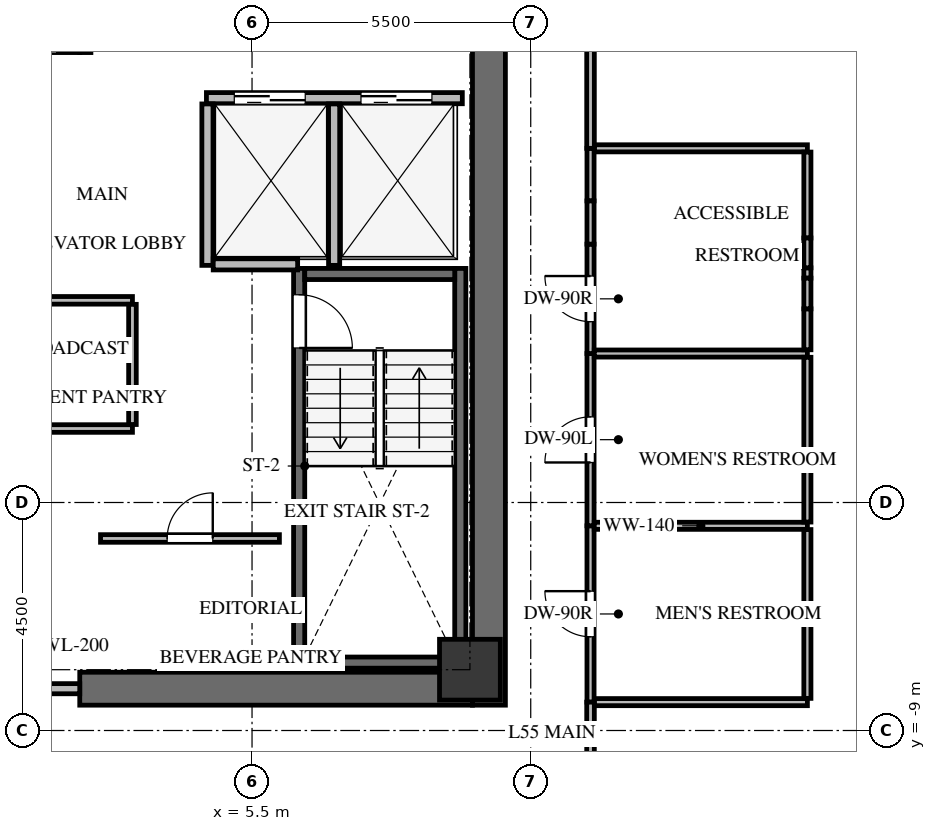
"""IFC4 building model, lengths in metres.
Left out: names, types, materials, properties, quantities, classifications, styles, units other than length and angle.
Written with IfcOpenShell. Run it as: python <this file> out.ifc"""

import sys

from ifc_helpers import new_model, si_unit, direction, frame, frame_2d, origin, origin_2d, place, context, subcontext, project, spatial, rectangle, extrude, source, transform, mapped, element, fill, save


model = new_model("IFC4")
c1 = context("Model", 3, precision=1e-05, world=origin(), true_north=direction((0.0, 1.0)))
c2 = subcontext(c1, "Body", "Model", "MODEL_VIEW")
j1 = project(units=[si_unit("LENGTHUNIT", "METRE"), si_unit("PLANEANGLEUNIT", "RADIAN")], contexts=[c1])
p1 = place(None, origin())
s1 = spatial("IfcSite", under=j1, at=p1, CompositionType="ELEMENT")
p2 = place(p1, origin())
s2 = spatial("IfcBuilding", under=s1, at=p2, CompositionType="ELEMENT")
p3 = place(p2, frame((0.0, 0.0, 200.2)))
s3 = spatial("IfcBuildingStorey", under=s2, at=p3, CompositionType="ELEMENT", Elevation=200.2)
p4 = place(p3, frame((10.175, -8.5, 0.0), z_axis=(0.0, 0.0, 1.0), x_axis=(0.0, 1.0, 0.0)))
e1 = element("IfcWall", 1, at=p4, inside=s3, PredefinedType="SHEAR", context=c2, shape_type="SweptSolid", body=[
    extrude(rectangle(XDim=17.0, YDim=0.65, at=frame_2d((8.5, 0.0))), origin(), (0.0, 0.0, 1.0), 3.0),
])
p5 = place(p3, frame((2.1, -8.175, 0.0), z_axis=(0.0, 0.0, 1.0), x_axis=(1.0, 0.0, 0.0)))
e2 = element("IfcWall", 2, at=p5, inside=s3, PredefinedType="SHEAR", context=c2, shape_type="SweptSolid", body=[
    extrude(rectangle(XDim=7.75, YDim=0.65, at=frame_2d((3.875, 0.0))), origin(), (0.0, 0.0, 1.0), 3.0),
])
p6 = place(p3, frame((9.61, -7.77, -0.24), z_axis=(0.0, 0.0, 1.0), x_axis=(0.0, 1.0, 0.0)))
e3 = element("IfcWall", 3, at=p6, inside=s3, PredefinedType="SHEAR", context=c2, shape_type="SweptSolid", body=[
    extrude(rectangle(XDim=7.89, YDim=0.22, at=frame_2d((3.945, 0.0))), origin(), (0.0, 0.0, 1.0), 3.0),
])
p7 = place(p3, frame((6.43, 0.12, -0.24), z_axis=(0.0, 0.0, 1.0), x_axis=(0.0, -1.0, 0.0)))
e4 = element("IfcWall", 4, at=p7, inside=s3, PredefinedType="SHEAR", context=c2, shape_type="SweptSolid", body=[
    extrude(rectangle(XDim=7.89, YDim=0.22, at=frame_2d((3.945, 0.0))), origin(), (0.0, 0.0, 1.0), 3.0),
])
p8 = place(p7, frame((0.52, 0.0, 0.0)))
e5 = element("IfcOpeningElement", 5, at=p8, cuts=e4, PredefinedType="OPENING", context=c2, shape_type="SweptSolid", body=[
    extrude(rectangle(XDim=1.05, YDim=2.15, at=frame_2d((0.525, 1.075))), frame((0.0, 0.12, 0.0), z_axis=(0.0, -1.0, 0.0), x_axis=(1.0, 0.0, 0.0)), (0.0, 0.0, 1.0), 0.24),
])
for number, where, z_axis, x_axis in (
    (6, (6.54, -7.66, -0.24), (0.0, 0.0, 1.0), (1.0, 0.0, 0.0)),
    (7, (9.5, 0.01, -0.24), (0.0, 0.0, 1.0), (-1.0, 0.0, 0.0)),
):
    element("IfcWall", number, at=place(p3, frame(where, z_axis=z_axis, x_axis=x_axis)), inside=s3, PredefinedType="SHEAR", context=c2, shape_type="SweptSolid", body=[
        extrude(rectangle(XDim=2.96, YDim=0.22, at=frame_2d((1.48, 0.0))), origin(), (0.0, 0.0, 1.0), 3.0),
    ])
p9 = place(p3, frame((2.21, 4.38, -0.24), z_axis=(0.0, 0.0, 1.0), x_axis=(0.0, 1.0, 0.0)))
e8 = element("IfcWall", 8, at=p9, inside=s3, PredefinedType="SHEAR", context=c2, shape_type="SweptSolid", body=[
    extrude(rectangle(XDim=3.4, YDim=0.22, at=frame_2d((1.7, 0.0))), origin(), (0.0, 0.0, 1.0), 3.0),
])
p10 = place(p3, frame((-5.25, 4.49, -0.24), z_axis=(0.0, 0.0, 1.0), x_axis=(1.0, 0.0, 0.0)))
e9 = element("IfcWall", 9, at=p10, inside=s3, PredefinedType="SHEAR", context=c2, shape_type="SweptSolid", body=[
    extrude(rectangle(XDim=7.35, YDim=0.22, at=frame_2d((3.675, 0.0))), origin(), (0.0, 0.0, 1.0), 3.0),
])
p11 = place(p10, frame((5.85, 0.0, 0.0)))
e10 = element("IfcOpeningElement", 10, at=p11, cuts=e9, PredefinedType="OPENING", context=c2, shape_type="SweptSolid", body=[
    extrude(rectangle(XDim=1.05, YDim=2.15, at=frame_2d((0.525, 1.075))), frame((0.0, 0.12, 0.0), z_axis=(0.0, -1.0, 0.0), x_axis=(1.0, 0.0, 0.0)), (0.0, 0.0, 1.0), 0.24),
])
m1 = source(origin(), c2, "Body", "SweptSolid", [
    extrude(rectangle(XDim=1.2, YDim=1.2, at=origin_2d()), origin(), (0.0, 0.0, 1.0), 3.0),
])
p12 = place(p3, frame((9.8, -7.8, -0.24), z_axis=(0.0, 0.0, 1.0), x_axis=(1.0, 0.0, 0.0)))
e11 = element("IfcColumn", 11, at=p12, inside=s3, PredefinedType="COLUMN", context=c2, shape_type="MappedRepresentation", body=[
    mapped(m1, transform((0.0, 0.0, 0.0), x_axis=(1.0, 0.0, 0.0), y_axis=(0.0, 1.0, 0.0), z_axis=(0.0, 0.0, 1.0), scale=1.0)),
])
p13 = place(p3, frame((-2.1, -8.175, 0.0), z_axis=(0.0, 0.0, 1.0), x_axis=(1.0, 0.0, 0.0)))
e12 = element("IfcWall", 12, at=p13, inside=s3, PredefinedType="SOLIDWALL", context=c2, shape_type="SweptSolid", body=[
    extrude(rectangle(XDim=4.2, YDim=0.2, at=frame_2d((2.1, 0.0))), origin(), (0.0, 0.0, 1.0), 2.745),
])
p14 = place(p13, frame((1.2, 0.0, 0.0)))
e13 = element("IfcOpeningElement", 13, at=p14, cuts=e12, PredefinedType="OPENING", context=c2, shape_type="SweptSolid", body=[
    extrude(rectangle(XDim=1.8, YDim=2.15, at=frame_2d((0.9, 1.075))), frame((0.0, 0.11, 0.0), z_axis=(0.0, -1.0, 0.0), x_axis=(1.0, 0.0, 0.0)), (0.0, 0.0, 1.0), 0.22),
])
p15 = place(p3, frame((4.6, 3.48, 0.0), z_axis=(0.0, 0.0, 1.0), x_axis=(1.0, 0.0, 0.0)))
e14 = element("IfcWall", 14, at=p15, inside=s3, PredefinedType="SOLIDWALL", context=c2, shape_type="SweptSolid", body=[
    extrude(rectangle(XDim=5.05, YDim=0.22, at=frame_2d((2.525, 0.0))), origin(), (0.0, 0.0, 1.0), 2.745),
])
p16 = place(p15, frame((0.55, 0.0, 0.0)))
e15 = element("IfcOpeningElement", 15, at=p16, cuts=e14, PredefinedType="OPENING", context=c2, shape_type="SweptSolid", body=[
    extrude(rectangle(XDim=1.4, YDim=2.15, at=frame_2d((0.7, 1.075))), frame((0.0, 0.12, 0.0), z_axis=(0.0, -1.0, 0.0), x_axis=(1.0, 0.0, 0.0)), (0.0, 0.0, 1.0), 0.24),
])
p17 = place(p15, frame((3.05, 0.0, 0.0)))
e16 = element("IfcOpeningElement", 16, at=p17, cuts=e14, PredefinedType="OPENING", context=c2, shape_type="SweptSolid", body=[
    extrude(rectangle(XDim=1.4, YDim=2.15, at=frame_2d((0.7, 1.075))), frame((0.0, 0.12, 0.0), z_axis=(0.0, -1.0, 0.0), x_axis=(1.0, 0.0, 0.0)), (0.0, 0.0, 1.0), 0.24),
])
for number, where, z_axis, x_axis in (
    (17, (4.62, 0.18, 0.0), (0.0, 0.0, 1.0), (0.0, 1.0, 0.0)),
    (18, (7.12, 0.18, 0.0), (0.0, 0.0, 1.0), (0.0, 1.0, 0.0)),
):
    element("IfcWall", number, at=place(p3, frame(where, z_axis=z_axis, x_axis=x_axis)), inside=s3, PredefinedType="SOLIDWALL", context=c2, shape_type="SweptSolid", body=[
        extrude(rectangle(XDim=3.186, YDim=0.22, at=frame_2d((1.593, 0.0))), origin(), (0.0, 0.0, 1.0), 2.745),
    ])
p18 = place(p3, frame((4.734, 0.2, 0.0), z_axis=(0.0, 0.0, 1.0), x_axis=(1.0, 0.0, 0.0)))
e19 = element("IfcWall", 19, at=p18, inside=s3, PredefinedType="SOLIDWALL", context=c2, shape_type="SweptSolid", body=[
    extrude(rectangle(XDim=1.666, YDim=0.22, at=frame_2d((0.833, 0.0))), origin(), (0.0, 0.0, 1.0), 2.745),
])
p19 = place(p3, frame((2.51, -5.21, 0.0), z_axis=(0.0, 0.0, 1.0), x_axis=(1.0, 0.0, 0.0)))
e20 = element("IfcWall", 20, at=p19, inside=s3, PredefinedType="PARTITIONING", context=c2, shape_type="SweptSolid", body=[
    extrude(rectangle(XDim=3.53, YDim=0.15, at=frame_2d((1.765, 0.0))), origin(), (0.0, 0.0, 1.0), 2.745),
])
p20 = place(p19, frame((1.315, 0.0, 0.0)))
e21 = element("IfcOpeningElement", 21, at=p20, cuts=e20, PredefinedType="OPENING", context=c2, shape_type="SweptSolid", body=[
    extrude(rectangle(XDim=0.9, YDim=2.05, at=frame_2d((0.45, 1.025))), frame((0.0, 0.085, 0.0), z_axis=(0.0, -1.0, 0.0), x_axis=(1.0, 0.0, 0.0)), (0.0, 0.0, 1.0), 0.17),
])
p21 = place(p3, frame((3.14, -3.04, 0.0), z_axis=(0.0, 0.0, 1.0), x_axis=(-1.0, 0.0, 0.0)))
e22 = element("IfcWall", 22, at=p21, inside=s3, PredefinedType="PARTITIONING", context=c2, shape_type="SweptSolid", body=[
    extrude(rectangle(XDim=7.48, YDim=0.15, at=frame_2d((3.74, 0.0))), origin(), (0.0, 0.0, 1.0), 2.745),
])
p22 = place(p21, frame((3.29, 0.0, 0.0)))
e23 = element("IfcOpeningElement", 23, at=p22, cuts=e22, PredefinedType="OPENING", context=c2, shape_type="SweptSolid", body=[
    extrude(rectangle(XDim=0.9, YDim=2.05, at=frame_2d((0.45, 1.025))), frame((0.0, 0.085, 0.0), z_axis=(0.0, -1.0, 0.0), x_axis=(1.0, 0.0, 0.0)), (0.0, 0.0, 1.0), 0.17),
])
p23 = place(p3, frame((-4.34, -0.51, 0.0), z_axis=(0.0, 0.0, 1.0), x_axis=(1.0, 0.0, 0.0)))
e24 = element("IfcWall", 24, at=p23, inside=s3, PredefinedType="PARTITIONING", context=c2, shape_type="SweptSolid", body=[
    extrude(rectangle(XDim=7.48, YDim=0.15, at=frame_2d((3.74, 0.0))), origin(), (0.0, 0.0, 1.0), 2.745),
])
p24 = place(p3, frame((3.14, -0.589, 0.0), z_axis=(0.0, 0.0, 1.0), x_axis=(0.0, -1.0, 0.0)))
e25 = element("IfcWall", 25, at=p24, inside=s3, PredefinedType="PARTITIONING", context=c2, shape_type="SweptSolid", body=[
    extrude(rectangle(XDim=2.372, YDim=0.15, at=frame_2d((1.186, 0.0))), origin(), (0.0, 0.0, 1.0), 2.745),
])
p25 = place(p3, frame((12.18, -8.44, 0.0), z_axis=(0.0, 0.0, 1.0), x_axis=(0.0, 1.0, 0.0)))
e26 = element("IfcWall", 26, at=p25, inside=s3, PredefinedType="PARTITIONING", context=c2, shape_type="SweptSolid", body=[
    extrude(rectangle(XDim=3.48, YDim=0.14, at=frame_2d((1.74, 0.0))), origin(), (0.0, 0.0, 1.0), 2.745),
])
p26 = place(p25, frame((1.29, 0.0, 0.0)))
e27 = element("IfcOpeningElement", 27, at=p26, cuts=e26, PredefinedType="OPENING", context=c2, shape_type="SweptSolid", body=[
    extrude(rectangle(XDim=0.9, YDim=2.05, at=frame_2d((0.45, 1.025))), frame((0.0, 0.08, 0.0), z_axis=(0.0, -1.0, 0.0), x_axis=(1.0, 0.0, 0.0)), (0.0, 0.0, 1.0), 0.16),
])
p27 = place(p3, frame((12.18, -4.96, 0.0), z_axis=(0.0, 0.0, 1.0), x_axis=(0.0, 1.0, 0.0)))
e28 = element("IfcWall", 28, at=p27, inside=s3, PredefinedType="PARTITIONING", context=c2, shape_type="SweptSolid", body=[
    extrude(rectangle(XDim=3.4, YDim=0.14, at=frame_2d((1.7, 0.0))), origin(), (0.0, 0.0, 1.0), 2.745),
])
p28 = place(p27, frame((1.25, 0.0, 0.0)))
e29 = element("IfcOpeningElement", 29, at=p28, cuts=e28, PredefinedType="OPENING", context=c2, shape_type="SweptSolid", body=[
    extrude(rectangle(XDim=0.9, YDim=2.05, at=frame_2d((0.45, 1.025))), frame((0.0, 0.08, 0.0), z_axis=(0.0, -1.0, 0.0), x_axis=(1.0, 0.0, 0.0)), (0.0, 0.0, 1.0), 0.16),
])
p29 = place(p3, frame((12.18, -1.56, 0.0), z_axis=(0.0, 0.0, 1.0), x_axis=(0.0, 1.0, 0.0)))
e30 = element("IfcWall", 30, at=p29, inside=s3, PredefinedType="PARTITIONING", context=c2, shape_type="SweptSolid", body=[
    extrude(rectangle(XDim=2.159, YDim=0.14, at=frame_2d((1.08, 0.0))), origin(), (0.0, 0.0, 1.0), 2.745),
])
p30 = place(p29, frame((0.629, 0.0, 0.0)))
e31 = element("IfcOpeningElement", 31, at=p30, cuts=e30, PredefinedType="OPENING", context=c2, shape_type="SweptSolid", body=[
    extrude(rectangle(XDim=0.9, YDim=2.05, at=frame_2d((0.45, 1.025))), frame((0.0, 0.08, 0.0), z_axis=(0.0, -1.0, 0.0), x_axis=(1.0, 0.0, 0.0)), (0.0, 0.0, 1.0), 0.16),
])
p31 = place(p3, frame((12.18, 1.452, 0.0), z_axis=(0.0, 0.0, 1.0), x_axis=(0.0, 1.0, 0.0)))
e32 = element("IfcWall", 32, at=p31, inside=s3, PredefinedType="PARTITIONING", context=c2, shape_type="SweptSolid", body=[
    extrude(rectangle(XDim=1.038, YDim=0.14, at=frame_2d((0.519, 0.0))), origin(), (0.0, 0.0, 1.0), 2.745),
])
p32 = place(p3, frame((12.18, 0.599, 0.0), z_axis=(0.0, 0.0, 1.0), x_axis=(0.0, 1.0, 0.0)))
e33 = element("IfcWall", 33, at=p32, inside=s3, PredefinedType="PARTITIONING", context=c2, shape_type="SweptSolid", body=[
    extrude(rectangle(XDim=0.853, YDim=0.14, at=frame_2d((0.427, 0.0))), origin(), (0.0, 0.0, 1.0), 1.942),
])
p33 = place(p3, frame((12.18, 2.49, 0.0), z_axis=(0.0, 0.0, 1.0), x_axis=(0.0, 1.0, 0.0)))
e34 = element("IfcWall", 34, at=p33, inside=s3, PredefinedType="PARTITIONING", context=c2, shape_type="SweptSolid", body=[
    extrude(rectangle(XDim=7.611, YDim=0.15, at=frame_2d((3.806, 0.0))), origin(), (0.0, 0.0, 1.0), 2.745),
])
p34 = place(p33, frame((3.331, 0.0, 0.0)))
e35 = element("IfcOpeningElement", 35, at=p34, cuts=e34, PredefinedType="OPENING", context=c2, shape_type="SweptSolid", body=[
    extrude(rectangle(XDim=0.95, YDim=2.1, at=frame_2d((0.475, 1.05))), frame((0.0, 0.085, 0.0), z_axis=(0.0, -1.0, 0.0), x_axis=(1.0, 0.0, 0.0)), (0.0, 0.0, 1.0), 0.17),
])
p35 = place(p3, frame((12.18, -10.101, 0.0), z_axis=(0.0, 0.0, 1.0), x_axis=(0.0, 1.0, 0.0)))
e36 = element("IfcWall", 36, at=p35, inside=s3, PredefinedType="PARTITIONING", context=c2, shape_type="SweptSolid", body=[
    extrude(rectangle(XDim=1.661, YDim=0.15, at=frame_2d((0.831, 0.0))), origin(), (0.0, 0.0, 1.0), 2.745),
])
p36 = place(p3, frame((12.254, -4.96, 0.0), z_axis=(0.0, 0.0, 1.0), x_axis=(1.0, 0.0, 0.0)))
e37 = element("IfcWall", 37, at=p36, inside=s3, PredefinedType="PARTITIONING", context=c2, shape_type="SweptSolid", body=[
    extrude(rectangle(XDim=4.206, YDim=0.14, at=frame_2d((2.103, 0.0))), origin(), (0.0, 0.0, 1.0), 2.745),
])
p37 = place(p3, frame((16.46, -8.44, 0.0), z_axis=(0.0, 0.0, 1.0), x_axis=(-1.0, 0.0, 0.0)))
e38 = element("IfcWall", 38, at=p37, inside=s3, PredefinedType="PARTITIONING", context=c2, shape_type="SweptSolid", body=[
    extrude(rectangle(XDim=4.201, YDim=0.14, at=frame_2d((2.101, 0.0))), origin(), (0.0, 0.0, 1.0), 2.745),
])
p38 = place(p3, frame((16.46, -5.034, 0.0), z_axis=(0.0, 0.0, 1.0), x_axis=(0.0, -1.0, 0.0)))
e39 = element("IfcWall", 39, at=p38, inside=s3, PredefinedType="PARTITIONING", context=c2, shape_type="SweptSolid", body=[
    extrude(rectangle(XDim=3.332, YDim=0.14, at=frame_2d((1.666, 0.0))), origin(), (0.0, 0.0, 1.0), 2.745),
])
p39 = place(p3, frame((12.254, -1.56, 0.0), z_axis=(0.0, 0.0, 1.0), x_axis=(1.0, 0.0, 0.0)))
e40 = element("IfcWall", 40, at=p39, inside=s3, PredefinedType="PARTITIONING", context=c2, shape_type="SweptSolid", body=[
    extrude(rectangle(XDim=4.206, YDim=0.14, at=frame_2d((2.103, 0.0))), origin(), (0.0, 0.0, 1.0), 2.745),
])
p40 = place(p3, frame((16.46, -1.634, 0.0), z_axis=(0.0, 0.0, 1.0), x_axis=(0.0, -1.0, 0.0)))
e41 = element("IfcWall", 41, at=p40, inside=s3, PredefinedType="PARTITIONING", context=c2, shape_type="SweptSolid", body=[
    extrude(rectangle(XDim=3.252, YDim=0.14, at=frame_2d((1.626, 0.0))), origin(), (0.0, 0.0, 1.0), 2.745),
])
p41 = place(p3, frame((12.259, 2.49, 0.0), z_axis=(0.0, 0.0, 1.0), x_axis=(1.0, 0.0, 0.0)))
e42 = element("IfcWall", 42, at=p41, inside=s3, PredefinedType="PARTITIONING", context=c2, shape_type="SweptSolid", body=[
    extrude(rectangle(XDim=4.201, YDim=0.14, at=frame_2d((2.101, 0.0))), origin(), (0.0, 0.0, 1.0), 2.745),
])
p42 = place(p3, frame((16.46, 2.416, 0.0), z_axis=(0.0, 0.0, 1.0), x_axis=(0.0, -1.0, 0.0)))
e43 = element("IfcWall", 43, at=p42, inside=s3, PredefinedType="PARTITIONING", context=c2, shape_type="SweptSolid", body=[
    extrude(rectangle(XDim=1.696, YDim=0.14, at=frame_2d((0.848, 0.0))), origin(), (0.0, 0.0, 1.0), 2.745),
])
p43 = place(p3, frame((16.46, 0.131, 0.0), z_axis=(0.0, 0.0, 1.0), x_axis=(0.0, -1.0, 0.0)))
e44 = element("IfcWall", 44, at=p43, inside=s3, PredefinedType="PARTITIONING", context=c2, shape_type="SweptSolid", body=[
    extrude(rectangle(XDim=0.203, YDim=0.14, at=frame_2d((0.102, 0.0))), origin(), (0.0, 0.0, 1.0), 2.745),
])
p44 = place(p3, frame((16.46, -0.678, 0.0), z_axis=(0.0, 0.0, 1.0), x_axis=(0.0, -1.0, 0.0)))
e45 = element("IfcWall", 45, at=p44, inside=s3, PredefinedType="PARTITIONING", context=c2, shape_type="SweptSolid", body=[
    extrude(rectangle(XDim=0.808, YDim=0.14, at=frame_2d((0.404, 0.0))), origin(), (0.0, 0.0, 1.0), 2.745),
])
p45 = place(p3, frame((16.46, 0.72, 0.0), z_axis=(0.0, 0.0, 1.0), x_axis=(0.0, -1.0, 0.0)))
e46 = element("IfcWall", 46, at=p45, inside=s3, PredefinedType="PARTITIONING", context=c2, shape_type="SweptSolid", body=[
    extrude(rectangle(XDim=0.589, YDim=0.14, at=frame_2d((0.294, 0.0))), origin(), (0.0, 0.0, 1.0), 1.942),
])
p46 = place(p3, frame((16.46, -0.072, 0.0), z_axis=(0.0, 0.0, 1.0), x_axis=(0.0, -1.0, 0.0)))
e47 = element("IfcWall", 47, at=p46, inside=s3, PredefinedType="PARTITIONING", context=c2, shape_type="SweptSolid", body=[
    extrude(rectangle(XDim=0.606, YDim=0.14, at=frame_2d((0.303, 0.0))), origin(), (0.0, 0.0, 1.0), 1.942),
])
m2 = source(origin(), c2, "Body", "SweptSolid", [
    extrude(rectangle(XDim=1.05, YDim=2.15, at=frame_2d((0.525, 1.075))), frame((0.0, 0.025, 0.0), z_axis=(0.0, -1.0, 0.0), x_axis=(1.0, 0.0, 0.0)), (0.0, 0.0, 1.0), 0.05),
])
p47 = place(p8, origin())
e48 = element("IfcDoor", 48, at=p47, inside=s3, OperationType="SINGLE_SWING_RIGHT", PredefinedType="DOOR", context=c2, shape_type="MappedRepresentation", body=[
    mapped(m2, transform((0.0, 0.0, 0.0), x_axis=(1.0, 0.0, 0.0), y_axis=(0.0, 1.0, 0.0), z_axis=(0.0, 0.0, 1.0), scale=1.0)),
])
fill(e5, e48)
m3 = source(origin(), c2, "Body", "SweptSolid", [
    extrude(rectangle(XDim=1.4, YDim=2.15, at=frame_2d((0.7, 1.075))), frame((0.0, 0.025, 0.0), z_axis=(0.0, -1.0, 0.0), x_axis=(1.0, 0.0, 0.0)), (0.0, 0.0, 1.0), 0.05),
])
p48 = place(p16, origin())
e49 = element("IfcDoor", 49, at=p48, inside=s3, OperationType="DOUBLE_DOOR_SLIDING", PredefinedType="DOOR", context=c2, shape_type="MappedRepresentation", body=[
    mapped(m3, transform((0.0, 0.0, 0.0), x_axis=(1.0, 0.0, 0.0), y_axis=(0.0, 1.0, 0.0), z_axis=(0.0, 0.0, 1.0), scale=1.0)),
])
fill(e15, e49)
p49 = place(p17, origin())
e50 = element("IfcDoor", 50, at=p49, inside=s3, OperationType="DOUBLE_DOOR_SLIDING", PredefinedType="DOOR", context=c2, shape_type="MappedRepresentation", body=[
    mapped(m3, transform((0.0, 0.0, 0.0), x_axis=(1.0, 0.0, 0.0), y_axis=(0.0, 1.0, 0.0), z_axis=(0.0, 0.0, 1.0), scale=1.0)),
])
fill(e16, e50)
m4 = source(origin(), c2, "Body", "SweptSolid", [
    extrude(rectangle(XDim=0.9, YDim=2.05, at=frame_2d((0.45, 1.025))), frame((0.0, 0.025, 0.0), z_axis=(0.0, -1.0, 0.0), x_axis=(1.0, 0.0, 0.0)), (0.0, 0.0, 1.0), 0.05),
])
p50 = place(p20, origin())
e51 = element("IfcDoor", 51, at=p50, inside=s3, OperationType="SINGLE_SWING_RIGHT", PredefinedType="DOOR", context=c2, shape_type="MappedRepresentation", body=[
    mapped(m4, transform((0.0, 0.0, 0.0), x_axis=(1.0, 0.0, 0.0), y_axis=(0.0, 1.0, 0.0), z_axis=(0.0, 0.0, 1.0), scale=1.0)),
])
fill(e21, e51)
m5 = source(origin(), c2, "Body", "SweptSolid", [
    extrude(rectangle(XDim=0.9, YDim=2.05, at=frame_2d((0.45, 1.025))), frame((0.0, 0.025, 0.0), z_axis=(0.0, -1.0, 0.0), x_axis=(1.0, 0.0, 0.0)), (0.0, 0.0, 1.0), 0.05),
])
p51 = place(p26, origin())
e52 = element("IfcDoor", 52, at=p51, inside=s3, OperationType="SINGLE_SWING_RIGHT", PredefinedType="DOOR", context=c2, shape_type="MappedRepresentation", body=[
    mapped(m5, transform((0.0, 0.0, 0.0), x_axis=(1.0, 0.0, 0.0), y_axis=(0.0, 1.0, 0.0), z_axis=(0.0, 0.0, 1.0), scale=1.0)),
])
fill(e27, e52)
m6 = source(origin(), c2, "Body", "SweptSolid", [
    extrude(rectangle(XDim=0.9, YDim=2.05, at=frame_2d((0.45, 1.025))), frame((0.0, 0.025, 0.0), z_axis=(0.0, -1.0, 0.0), x_axis=(1.0, 0.0, 0.0)), (0.0, 0.0, 1.0), 0.05),
])
p52 = place(p28, origin())
e53 = element("IfcDoor", 53, at=p52, inside=s3, OperationType="SINGLE_SWING_LEFT", PredefinedType="DOOR", context=c2, shape_type="MappedRepresentation", body=[
    mapped(m6, transform((0.0, 0.0, 0.0), x_axis=(1.0, 0.0, 0.0), y_axis=(0.0, 1.0, 0.0), z_axis=(0.0, 0.0, 1.0), scale=1.0)),
])
fill(e29, e53)
p53 = place(p30, origin())
e54 = element("IfcDoor", 54, at=p53, inside=s3, OperationType="SINGLE_SWING_RIGHT", PredefinedType="DOOR", context=c2, shape_type="MappedRepresentation", body=[
    mapped(m5, transform((0.0, 0.0, 0.0), x_axis=(1.0, 0.0, 0.0), y_axis=(0.0, 1.0, 0.0), z_axis=(0.0, 0.0, 1.0), scale=1.0)),
])
fill(e31, e54)
save(model, sys.argv[1])
